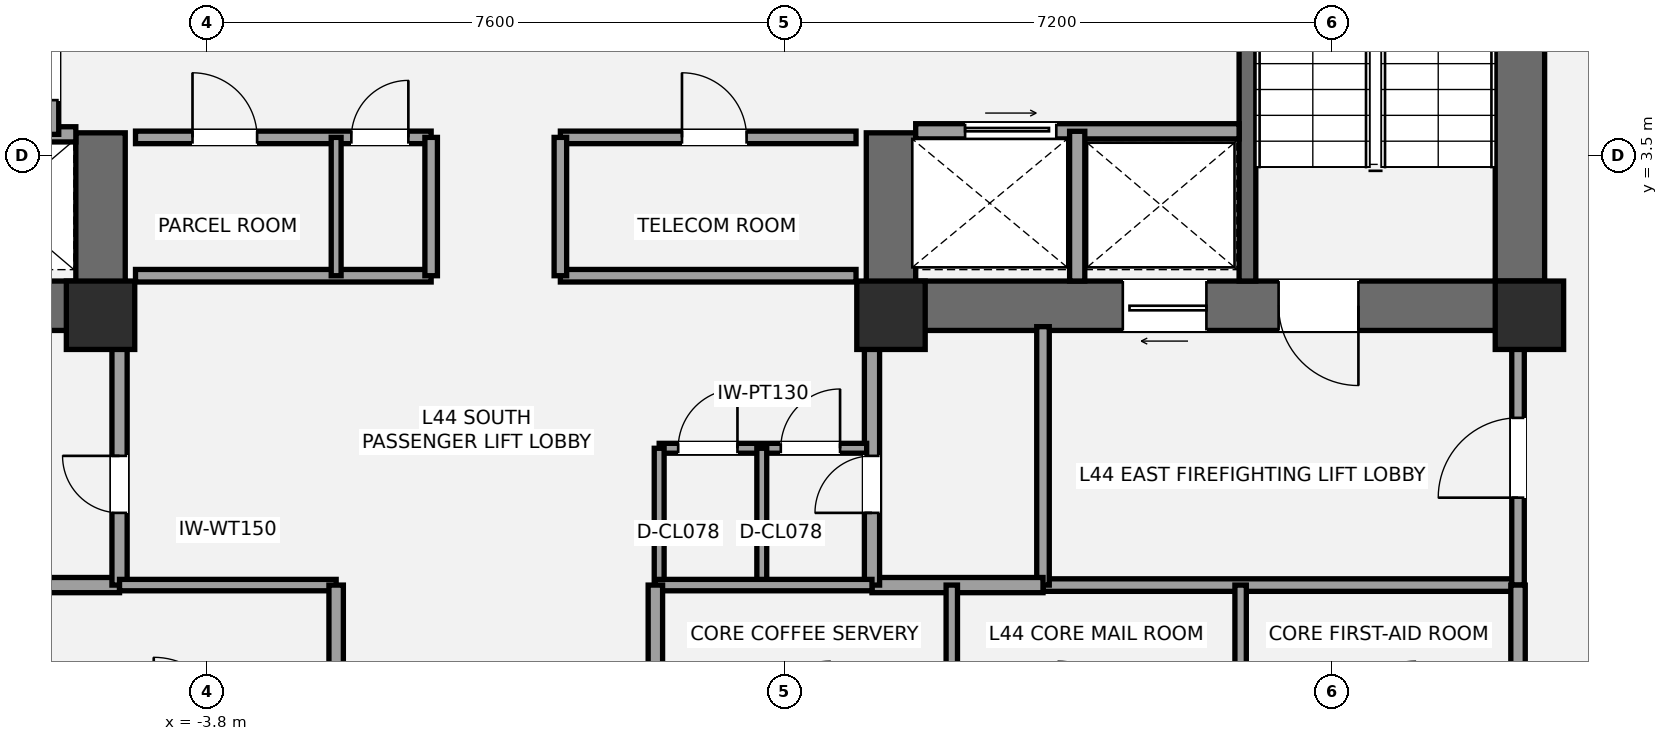
"""IFC4 building model, lengths in metres.
Left out: names, types, materials, properties, quantities, classifications, styles, units other than length and angle.
Written with IfcOpenShell. Run it as: python <this file> out.ifc"""

import sys

from ifc_helpers import new_model, si_unit, direction, frame, frame_2d, origin, origin_2d, place, context, subcontext, project, spatial, rectangle, extrude, element, fill, save


model = new_model("IFC4")
c1 = context("Model", 3, precision=1e-05, world=origin(), true_north=direction((0.0, 1.0)))
c2 = subcontext(c1, "Body", "Model", "MODEL_VIEW")
j1 = project(units=[si_unit("LENGTHUNIT", "METRE"), si_unit("PLANEANGLEUNIT", "RADIAN")], contexts=[c1])
p1 = place(None, origin())
s1 = spatial("IfcSite", under=j1, at=p1, CompositionType="ELEMENT")
p2 = place(p1, origin())
s2 = spatial("IfcBuilding", under=s1, at=p2, CompositionType="ELEMENT")
p3 = place(p2, frame((0.0, 0.0, 163.0)))
s3 = spatial("IfcBuildingStorey", under=s2, at=p3, CompositionType="ELEMENT", Elevation=163.0)
p4 = place(p3, frame((-4.875, 1.525, 0.0), z_axis=(0.0, 0.0, 1.0), x_axis=(-1.0, 0.0, 0.0)))
e1 = element("IfcWall", 1, at=p4, inside=s3, PredefinedType="SHEAR", context=c2, shape_type="SweptSolid", body=[
    extrude(rectangle(XDim=8.925, YDim=0.65, at=frame_2d((4.462, 0.0))), origin(), (0.0, 0.0, 1.0), 3.2),
])
p5 = place(p4, frame((5.425, 0.0, 0.0)))
e2 = element("IfcOpeningElement", 2, at=p5, cuts=e1, PredefinedType="OPENING", context=c2, shape_type="SweptSolid", body=[
    extrude(rectangle(XDim=1.05, YDim=2.15, at=frame_2d((0.525, 1.075))), frame((0.0, 0.335, 0.0), z_axis=(0.0, -1.0, 0.0), x_axis=(1.0, 0.0, 0.0)), (0.0, 0.0, 1.0), 0.67),
])
p6 = place(p4, frame((3.755, 0.0, 0.0)))
e3 = element("IfcOpeningElement", 3, at=p6, cuts=e1, PredefinedType="OPENING", context=c2, shape_type="SweptSolid", body=[
    extrude(rectangle(XDim=1.1, YDim=2.2, at=frame_2d((0.55, 1.1))), frame((0.0, 0.335, 0.0), z_axis=(0.0, -1.0, 0.0), x_axis=(1.0, 0.0, 0.0)), (0.0, 0.0, 1.0), 0.67),
])
p7 = place(p3, frame((-5.2, 1.2, 0.0), z_axis=(0.0, 0.0, 1.0), x_axis=(0.0, 1.0, 0.0)))
e4 = element("IfcWall", 4, at=p7, inside=s3, PredefinedType="SHEAR", context=c2, shape_type="SweptSolid", body=[
    extrude(rectangle(XDim=2.6, YDim=0.65, at=frame_2d((1.3, 0.0))), origin(), (0.0, 0.0, 1.0), 3.2),
])
p8 = place(p3, frame((13.475, 1.2, 0.0), z_axis=(0.0, 0.0, 1.0), x_axis=(0.0, 1.0, 0.0)))
e5 = element("IfcWall", 5, at=p8, inside=s3, PredefinedType="SHEAR", context=c2, shape_type="SweptSolid", body=[
    extrude(rectangle(XDim=8.45, YDim=0.65, at=frame_2d((4.225, 0.0))), origin(), (0.0, 0.0, 1.0), 3.2),
])
p9 = place(p3, frame((13.8, 1.525, 0.0), z_axis=(0.0, 0.0, 1.0), x_axis=(-1.0, 0.0, 0.0)))
e6 = element("IfcWall", 6, at=p9, inside=s3, PredefinedType="SHEAR", context=c2, shape_type="SweptSolid", body=[
    extrude(rectangle(XDim=8.925, YDim=0.65, at=frame_2d((4.462, 0.0))), origin(), (0.0, 0.0, 1.0), 3.2),
])
p10 = place(p9, frame((2.45, 0.0, 0.0)))
e7 = element("IfcOpeningElement", 7, at=p10, cuts=e6, PredefinedType="OPENING", context=c2, shape_type="SweptSolid", body=[
    extrude(rectangle(XDim=1.05, YDim=2.15, at=frame_2d((0.525, 1.075))), frame((0.0, 0.335, 0.0), z_axis=(0.0, -1.0, 0.0), x_axis=(1.0, 0.0, 0.0)), (0.0, 0.0, 1.0), 0.67),
])
p11 = place(p9, frame((4.45, 0.0, 0.0)))
e8 = element("IfcOpeningElement", 8, at=p11, cuts=e6, PredefinedType="OPENING", context=c2, shape_type="SweptSolid", body=[
    extrude(rectangle(XDim=1.1, YDim=2.2, at=frame_2d((0.55, 1.1))), frame((0.0, 0.335, 0.0), z_axis=(0.0, -1.0, 0.0), x_axis=(1.0, 0.0, 0.0)), (0.0, 0.0, 1.0), 0.67),
])
p12 = place(p3, frame((5.2, 1.2, 0.0), z_axis=(0.0, 0.0, 1.0), x_axis=(0.0, 1.0, 0.0)))
e9 = element("IfcWall", 9, at=p12, inside=s3, PredefinedType="SHEAR", context=c2, shape_type="SweptSolid", body=[
    extrude(rectangle(XDim=2.6, YDim=0.65, at=frame_2d((1.3, 0.0))), origin(), (0.0, 0.0, 1.0), 3.2),
])
p13 = place(p3, frame((9.89, 1.85, 0.0), z_axis=(0.0, 0.0, 1.0), x_axis=(0.0, 1.0, 0.0)))
e10 = element("IfcWall", 10, at=p13, inside=s3, PredefinedType="SHEAR", context=c2, shape_type="SweptSolid", body=[
    extrude(rectangle(XDim=7.15, YDim=0.22, at=frame_2d((3.575, 0.0))), origin(), (0.0, 0.0, 1.0), 3.2),
])
for number, where, z_axis, x_axis in (
    (11, (-5.2, 1.4, 0.0), (0.0, 0.0, 1.0), (1.0, 0.0, 0.0)),
    (12, (5.2, 1.4, 0.0), (0.0, 0.0, 1.0), (1.0, 0.0, 0.0)),
    (13, (13.6, 1.4, 0.0), (0.0, 0.0, 1.0), (1.0, 0.0, 0.0)),
):
    element("IfcColumn", number, at=place(p3, frame(where, z_axis=z_axis, x_axis=x_axis)), inside=s3, PredefinedType="COLUMN", context=c2, shape_type="SweptSolid", body=[
        extrude(rectangle(XDim=0.9, YDim=0.9, at=origin_2d()), origin(), (0.0, 0.0, 1.0), 3.2),
    ])
p14 = place(p3, frame((-7.2, -2.15, 0.0), z_axis=(0.0, 0.0, 1.0), x_axis=(1.0, 0.0, 0.0)))
e14 = element("IfcWall", 14, at=p14, inside=s3, PredefinedType="SOLIDWALL", context=c2, shape_type="SweptSolid", body=[
    extrude(rectangle(XDim=2.25, YDim=0.2, at=frame_2d((1.125, 0.0))), origin(), (0.0, 0.0, 1.0), 3.02),
])
p15 = place(p3, frame((-4.95, -2.15, 0.0), z_axis=(0.0, 0.0, 1.0), x_axis=(0.0, 1.0, 0.0)))
e15 = element("IfcWall", 15, at=p15, inside=s3, PredefinedType="SOLIDWALL", context=c2, shape_type="SweptSolid", body=[
    extrude(rectangle(XDim=3.4, YDim=0.2, at=frame_2d((1.7, 0.0))), origin(), (0.0, 0.0, 1.0), 2.473),
])
p16 = place(p15, frame((0.95, 0.0, 0.0)))
e16 = element("IfcOpeningElement", 16, at=p16, cuts=e15, PredefinedType="OPENING", context=c2, shape_type="SweptSolid", body=[
    extrude(rectangle(XDim=0.75, YDim=2.1, at=frame_2d((0.375, 1.05))), frame((0.0, 0.11, 0.0), z_axis=(0.0, -1.0, 0.0), x_axis=(1.0, 0.0, 0.0)), (0.0, 0.0, 1.0), 0.22),
])
p17 = place(p3, frame((7.2, -2.15, 0.0), z_axis=(0.0, 0.0, 1.0), x_axis=(1.0, 0.0, 0.0)))
e17 = element("IfcWall", 17, at=p17, inside=s3, PredefinedType="PARTITIONING", context=c2, shape_type="SweptSolid", body=[
    extrude(rectangle(XDim=6.25, YDim=0.165, at=frame_2d((3.125, 0.0))), origin(), (0.0, 0.0, 1.0), 3.02),
])
p18 = place(p3, frame((7.2, -2.15, 0.0), z_axis=(0.0, 0.0, 1.0), x_axis=(0.0, 1.0, 0.0)))
e18 = element("IfcWall", 18, at=p18, inside=s3, PredefinedType="PARTITIONING", context=c2, shape_type="SweptSolid", body=[
    extrude(rectangle(XDim=3.4, YDim=0.165, at=frame_2d((1.7, 0.0))), origin(), (0.0, 0.0, 1.0), 2.473),
])
p19 = place(p3, frame((13.45, -2.15, 0.0), z_axis=(0.0, 0.0, 1.0), x_axis=(0.0, 1.0, 0.0)))
e19 = element("IfcWall", 19, at=p19, inside=s3, PredefinedType="PARTITIONING", context=c2, shape_type="SweptSolid", body=[
    extrude(rectangle(XDim=3.4, YDim=0.165, at=frame_2d((1.7, 0.0))), origin(), (0.0, 0.0, 1.0), 3.02),
])
p20 = place(p19, frame((1.15, 0.0, 0.0)))
e20 = element("IfcOpeningElement", 20, at=p20, cuts=e19, PredefinedType="OPENING", context=c2, shape_type="SweptSolid", body=[
    extrude(rectangle(XDim=1.05, YDim=2.15, at=frame_2d((0.525, 1.075))), frame((0.0, 0.093, 0.0), z_axis=(0.0, -1.0, 0.0), x_axis=(1.0, 0.0, 0.0)), (0.0, 0.0, 1.0), 0.185),
])
p21 = place(p3, frame((4.95, -2.15, 0.0), z_axis=(0.0, 0.0, 1.0), x_axis=(1.0, 0.0, 0.0)))
e21 = element("IfcWall", 21, at=p21, inside=s3, PredefinedType="SOLIDWALL", context=c2, shape_type="SweptSolid", body=[
    extrude(rectangle(XDim=2.25, YDim=0.2, at=frame_2d((1.125, 0.0))), origin(), (0.0, 0.0, 1.0), 3.02),
])
p22 = place(p3, frame((4.95, -2.15, 0.0), z_axis=(0.0, 0.0, 1.0), x_axis=(0.0, 1.0, 0.0)))
e22 = element("IfcWall", 22, at=p22, inside=s3, PredefinedType="SOLIDWALL", context=c2, shape_type="SweptSolid", body=[
    extrude(rectangle(XDim=3.4, YDim=0.2, at=frame_2d((1.7, 0.0))), origin(), (0.0, 0.0, 1.0), 2.473),
])
p23 = place(p22, frame((0.95, 0.0, 0.0)))
e23 = element("IfcOpeningElement", 23, at=p23, cuts=e22, PredefinedType="OPENING", context=c2, shape_type="SweptSolid", body=[
    extrude(rectangle(XDim=0.75, YDim=2.1, at=frame_2d((0.375, 1.05))), frame((0.0, 0.11, 0.0), z_axis=(0.0, -1.0, 0.0), x_axis=(1.0, 0.0, 0.0)), (0.0, 0.0, 1.0), 0.22),
])
p24 = place(p3, frame((2.15, -0.35, 0.0), z_axis=(0.0, 0.0, 1.0), x_axis=(1.0, 0.0, 0.0)))
e24 = element("IfcWall", 24, at=p24, inside=s3, PredefinedType="PARTITIONING", context=c2, shape_type="SweptSolid", body=[
    extrude(rectangle(XDim=2.73, YDim=0.13, at=frame_2d((1.365, 0.0))), origin(), (0.0, 0.0, 1.0), 3.02),
])
p25 = place(p24, frame((0.25, 0.0, 0.0)))
e25 = element("IfcOpeningElement", 25, at=p25, cuts=e24, PredefinedType="OPENING", context=c2, shape_type="SweptSolid", body=[
    extrude(rectangle(XDim=0.78, YDim=2.1, at=frame_2d((0.39, 1.05))), frame((0.0, 0.075, 0.0), z_axis=(0.0, -1.0, 0.0), x_axis=(1.0, 0.0, 0.0)), (0.0, 0.0, 1.0), 0.15),
])
p26 = place(p24, frame((1.6, 0.0, 0.0)))
e26 = element("IfcOpeningElement", 26, at=p26, cuts=e24, PredefinedType="OPENING", context=c2, shape_type="SweptSolid", body=[
    extrude(rectangle(XDim=0.78, YDim=2.1, at=frame_2d((0.39, 1.05))), frame((0.0, 0.075, 0.0), z_axis=(0.0, -1.0, 0.0), x_axis=(1.0, 0.0, 0.0)), (0.0, 0.0, 1.0), 0.15),
])
p27 = place(p3, frame((2.15, -2.15, 0.0), z_axis=(0.0, 0.0, 1.0), x_axis=(0.0, 1.0, 0.0)))
e27 = element("IfcWall", 27, at=p27, inside=s3, PredefinedType="PARTITIONING", context=c2, shape_type="SweptSolid", body=[
    extrude(rectangle(XDim=1.8, YDim=0.13, at=frame_2d((0.9, 0.0))), origin(), (0.0, 0.0, 1.0), 3.02),
])
p28 = place(p3, frame((3.5, -2.15, 0.0), z_axis=(0.0, 0.0, 1.0), x_axis=(0.0, 1.0, 0.0)))
e28 = element("IfcWall", 28, at=p28, inside=s3, PredefinedType="PARTITIONING", context=c2, shape_type="SweptSolid", body=[
    extrude(rectangle(XDim=1.8, YDim=0.13, at=frame_2d((0.9, 0.0))), origin(), (0.0, 0.0, 1.0), 2.473),
])
p29 = place(p3, frame((-9.78, 3.78, 0.0), z_axis=(0.0, 0.0, 1.0), x_axis=(1.0, 0.0, 0.0)))
e29 = element("IfcWall", 29, at=p29, inside=s3, PredefinedType="SOLIDWALL", context=c2, shape_type="SweptSolid", body=[
    extrude(rectangle(XDim=4.255, YDim=0.2, at=frame_2d((2.127, 0.0))), origin(), (0.0, 0.0, 1.0), 3.02),
])
p30 = place(p3, frame((-5.85, 3.78, 0.0), z_axis=(0.0, 0.0, 1.0), x_axis=(0.0, 1.0, 0.0)))
e30 = element("IfcWall", 30, at=p30, inside=s3, PredefinedType="SOLIDWALL", context=c2, shape_type="SweptSolid", body=[
    extrude(rectangle(XDim=1.69, YDim=0.2, at=frame_2d((0.845, 0.0))), origin(), (0.0, 0.0, 1.0), 3.02),
])
p31 = place(p30, frame((0.45, 0.0, 0.0)))
e31 = element("IfcOpeningElement", 31, at=p31, cuts=e30, PredefinedType="OPENING", context=c2, shape_type="SweptSolid", body=[
    extrude(rectangle(XDim=0.75, YDim=2.1, at=frame_2d((0.375, 1.05))), frame((0.0, 0.11, 0.0), z_axis=(0.0, -1.0, 0.0), x_axis=(1.0, 0.0, 0.0)), (0.0, 0.0, 1.0), 0.22),
])
p32 = place(p3, frame((5.525, 3.82, 0.0), z_axis=(0.0, 0.0, 1.0), x_axis=(1.0, 0.0, 0.0)))
e32 = element("IfcWall", 32, at=p32, inside=s3, PredefinedType="SOLIDWALL", context=c2, shape_type="SweptSolid", body=[
    extrude(rectangle(XDim=4.255, YDim=0.2, at=frame_2d((2.127, 0.0))), origin(), (0.0, 0.0, 1.0), 3.02),
])
p33 = place(p32, frame((0.65, 0.0, 0.0)))
e33 = element("IfcOpeningElement", 33, at=p33, cuts=e32, PredefinedType="OPENING", context=c2, shape_type="SweptSolid", body=[
    extrude(rectangle(XDim=1.2, YDim=2.2, at=frame_2d((0.6, 1.1))), frame((0.0, 0.11, 0.0), z_axis=(0.0, -1.0, 0.0), x_axis=(1.0, 0.0, 0.0)), (0.0, 0.0, 1.0), 0.22),
])
p34 = place(p3, frame((7.65, 1.85, 0.0), z_axis=(0.0, 0.0, 1.0), x_axis=(0.0, 1.0, 0.0)))
e34 = element("IfcWall", 34, at=p34, inside=s3, PredefinedType="SOLIDWALL", context=c2, shape_type="SweptSolid", body=[
    extrude(rectangle(XDim=1.97, YDim=0.2, at=frame_2d((0.985, 0.0))), origin(), (0.0, 0.0, 1.0), 3.02),
])
p35 = place(p3, frame((-4.74, 1.92, 0.0), z_axis=(0.0, 0.0, 1.0), x_axis=(1.0, 0.0, 0.0)))
e35 = element("IfcWall", 35, at=p35, inside=s3, PredefinedType="PARTITIONING", context=c2, shape_type="SweptSolid", body=[
    extrude(rectangle(XDim=3.89, YDim=0.165, at=frame_2d((1.945, 0.0))), origin(), (0.0, 0.0, 1.0), 2.16),
])
p36 = place(p3, frame((-4.74, 3.74, 0.0), z_axis=(0.0, 0.0, 1.0), x_axis=(1.0, 0.0, 0.0)))
e36 = element("IfcWall", 36, at=p36, inside=s3, PredefinedType="PARTITIONING", context=c2, shape_type="SweptSolid", body=[
    extrude(rectangle(XDim=3.89, YDim=0.165, at=frame_2d((1.945, 0.0))), origin(), (0.0, 0.0, 1.0), 3.02),
])
p37 = place(p36, frame((0.75, 0.0, 0.0)))
e37 = element("IfcOpeningElement", 37, at=p37, cuts=e36, PredefinedType="OPENING", context=c2, shape_type="SweptSolid", body=[
    extrude(rectangle(XDim=0.85, YDim=2.1, at=frame_2d((0.425, 1.05))), frame((0.0, 0.093, 0.0), z_axis=(0.0, -1.0, 0.0), x_axis=(1.0, 0.0, 0.0)), (0.0, 0.0, 1.0), 0.185),
])
p38 = place(p36, frame((2.84, 0.0, 0.0)))
e38 = element("IfcOpeningElement", 38, at=p38, cuts=e36, PredefinedType="OPENING", context=c2, shape_type="SweptSolid", body=[
    extrude(rectangle(XDim=0.75, YDim=2.1, at=frame_2d((0.375, 1.05))), frame((0.0, 0.093, 0.0), z_axis=(0.0, -1.0, 0.0), x_axis=(1.0, 0.0, 0.0)), (0.0, 0.0, 1.0), 0.185),
])
p39 = place(p3, frame((-0.85, 1.92, 0.0), z_axis=(0.0, 0.0, 1.0), x_axis=(0.0, 1.0, 0.0)))
e39 = element("IfcWall", 39, at=p39, inside=s3, PredefinedType="PARTITIONING", context=c2, shape_type="SweptSolid", body=[
    extrude(rectangle(XDim=1.82, YDim=0.165, at=frame_2d((0.91, 0.0))), origin(), (0.0, 0.0, 1.0), 3.02),
])
p40 = place(p3, frame((0.85, 1.92, 0.0), z_axis=(0.0, 0.0, 1.0), x_axis=(1.0, 0.0, 0.0)))
e40 = element("IfcWall", 40, at=p40, inside=s3, PredefinedType="PARTITIONING", context=c2, shape_type="SweptSolid", body=[
    extrude(rectangle(XDim=3.89, YDim=0.165, at=frame_2d((1.945, 0.0))), origin(), (0.0, 0.0, 1.0), 2.16),
])
p41 = place(p3, frame((0.85, 3.74, 0.0), z_axis=(0.0, 0.0, 1.0), x_axis=(1.0, 0.0, 0.0)))
e41 = element("IfcWall", 41, at=p41, inside=s3, PredefinedType="PARTITIONING", context=c2, shape_type="SweptSolid", body=[
    extrude(rectangle(XDim=3.89, YDim=0.165, at=frame_2d((1.945, 0.0))), origin(), (0.0, 0.0, 1.0), 3.02),
])
p42 = place(p41, frame((1.6, 0.0, 0.0)))
e42 = element("IfcOpeningElement", 42, at=p42, cuts=e41, PredefinedType="OPENING", context=c2, shape_type="SweptSolid", body=[
    extrude(rectangle(XDim=0.85, YDim=2.1, at=frame_2d((0.425, 1.05))), frame((0.0, 0.093, 0.0), z_axis=(0.0, -1.0, 0.0), x_axis=(1.0, 0.0, 0.0)), (0.0, 0.0, 1.0), 0.185),
])
p43 = place(p3, frame((0.85, 1.92, 0.0), z_axis=(0.0, 0.0, 1.0), x_axis=(0.0, 1.0, 0.0)))
e43 = element("IfcWall", 43, at=p43, inside=s3, PredefinedType="PARTITIONING", context=c2, shape_type="SweptSolid", body=[
    extrude(rectangle(XDim=1.82, YDim=0.165, at=frame_2d((0.91, 0.0))), origin(), (0.0, 0.0, 1.0), 3.02),
])
p44 = place(p3, frame((-2.1, 1.92, 0.0), z_axis=(0.0, 0.0, 1.0), x_axis=(0.0, 1.0, 0.0)))
e44 = element("IfcWall", 44, at=p44, inside=s3, PredefinedType="PARTITIONING", context=c2, shape_type="SweptSolid", body=[
    extrude(rectangle(XDim=1.82, YDim=0.13, at=frame_2d((0.91, 0.0))), origin(), (0.0, 0.0, 1.0), 3.02),
])
p45 = place(p3, frame((-4.95, -2.15, 0.0), z_axis=(0.0, 0.0, 1.0), x_axis=(1.0, 0.0, 0.0)))
e45 = element("IfcWall", 45, at=p45, inside=s3, PredefinedType="PLUMBINGWALL", context=c2, shape_type="SweptSolid", body=[
    extrude(rectangle(XDim=2.85, YDim=0.15, at=frame_2d((1.425, 0.0))), origin(), (0.0, 0.0, 1.0), 2.473),
])
p46 = place(p3, frame((-2.1, -4.05, 0.0), z_axis=(0.0, 0.0, 1.0), x_axis=(0.0, 1.0, 0.0)))
e46 = element("IfcWall", 46, at=p46, inside=s3, PredefinedType="PLUMBINGWALL", context=c2, shape_type="SweptSolid", body=[
    extrude(rectangle(XDim=1.9, YDim=0.19, at=frame_2d((0.95, 0.0))), origin(), (0.0, 0.0, 1.0), 2.473),
])
p47 = place(p3, frame((2.1, -2.15, 0.0), z_axis=(0.0, 0.0, 1.0), x_axis=(1.0, 0.0, 0.0)))
e47 = element("IfcWall", 47, at=p47, inside=s3, PredefinedType="PLUMBINGWALL", context=c2, shape_type="SweptSolid", body=[
    extrude(rectangle(XDim=2.85, YDim=0.15, at=frame_2d((1.425, 0.0))), origin(), (0.0, 0.0, 1.0), 3.02),
])
for number, where, z_axis, x_axis in (
    (48, (2.1, -4.05, 0.0), (0.0, 0.0, 1.0), (0.0, 1.0, 0.0)),
    (49, (13.45, -4.05, 0.0), (0.0, 0.0, 1.0), (0.0, 1.0, 0.0)),
):
    element("IfcWall", number, at=place(p3, frame(where, z_axis=z_axis, x_axis=x_axis)), inside=s3, PredefinedType="PLUMBINGWALL", context=c2, shape_type="SweptSolid", body=[
        extrude(rectangle(XDim=1.9, YDim=0.19, at=frame_2d((0.95, 0.0))), origin(), (0.0, 0.0, 1.0), 2.473),
    ])
p48 = place(p3, frame((6.0, -4.05, 0.0), z_axis=(0.0, 0.0, 1.0), x_axis=(0.0, 1.0, 0.0)))
e50 = element("IfcWall", 50, at=p48, inside=s3, PredefinedType="PLUMBINGWALL", context=c2, shape_type="SweptSolid", body=[
    extrude(rectangle(XDim=1.9, YDim=0.15, at=frame_2d((0.95, 0.0))), origin(), (0.0, 0.0, 1.0), 2.473),
])
p49 = place(p3, frame((9.8, -4.05, 0.0), z_axis=(0.0, 0.0, 1.0), x_axis=(0.0, 1.0, 0.0)))
e51 = element("IfcWall", 51, at=p49, inside=s3, PredefinedType="PLUMBINGWALL", context=c2, shape_type="SweptSolid", body=[
    extrude(rectangle(XDim=1.9, YDim=0.15, at=frame_2d((0.95, 0.0))), origin(), (0.0, 0.0, 1.0), 3.02),
])
p50 = place(p10, origin())
e52 = element("IfcDoor", 52, at=p50, inside=s3, OperationType="SINGLE_SWING_LEFT", PredefinedType="DOOR", context=c2, shape_type="SweptSolid", body=[
    extrude(rectangle(XDim=1.05, YDim=2.15, at=frame_2d((0.525, 1.075))), frame((0.0, 0.025, 0.0), z_axis=(0.0, -1.0, 0.0), x_axis=(1.0, 0.0, 0.0)), (0.0, 0.0, 1.0), 0.05),
])
fill(e7, e52)
p51 = place(p16, origin())
e53 = element("IfcDoor", 53, at=p51, inside=s3, OperationType="SINGLE_SWING_RIGHT", PredefinedType="DOOR", context=c2, shape_type="SweptSolid", body=[
    extrude(rectangle(XDim=0.75, YDim=2.1, at=frame_2d((0.375, 1.05))), frame((0.0, 0.025, 0.0), z_axis=(0.0, -1.0, 0.0), x_axis=(1.0, 0.0, 0.0)), (0.0, 0.0, 1.0), 0.05),
])
fill(e16, e53)
p52 = place(p20, origin())
e54 = element("IfcDoor", 54, at=p52, inside=s3, OperationType="SINGLE_SWING_LEFT", PredefinedType="DOOR", context=c2, shape_type="SweptSolid", body=[
    extrude(rectangle(XDim=1.05, YDim=2.15, at=frame_2d((0.525, 1.075))), frame((0.0, 0.025, 0.0), z_axis=(0.0, -1.0, 0.0), x_axis=(1.0, 0.0, 0.0)), (0.0, 0.0, 1.0), 0.05),
])
fill(e20, e54)
p53 = place(p23, origin())
e55 = element("IfcDoor", 55, at=p53, inside=s3, OperationType="SINGLE_SWING_LEFT", PredefinedType="DOOR", context=c2, shape_type="SweptSolid", body=[
    extrude(rectangle(XDim=0.75, YDim=2.1, at=frame_2d((0.375, 1.05))), frame((0.0, 0.025, 0.0), z_axis=(0.0, -1.0, 0.0), x_axis=(1.0, 0.0, 0.0)), (0.0, 0.0, 1.0), 0.05),
])
fill(e23, e55)
p54 = place(p25, origin())
e56 = element("IfcDoor", 56, at=p54, inside=s3, OperationType="SINGLE_SWING_RIGHT", PredefinedType="DOOR", context=c2, shape_type="SweptSolid", body=[
    extrude(rectangle(XDim=0.78, YDim=2.1, at=frame_2d((0.39, 1.05))), frame((0.0, 0.025, 0.0), z_axis=(0.0, -1.0, 0.0), x_axis=(1.0, 0.0, 0.0)), (0.0, 0.0, 1.0), 0.05),
])
fill(e25, e56)
p55 = place(p26, origin())
e57 = element("IfcDoor", 57, at=p55, inside=s3, OperationType="SINGLE_SWING_RIGHT", PredefinedType="DOOR", context=c2, shape_type="SweptSolid", body=[
    extrude(rectangle(XDim=0.78, YDim=2.1, at=frame_2d((0.39, 1.05))), frame((0.0, 0.025, 0.0), z_axis=(0.0, -1.0, 0.0), x_axis=(1.0, 0.0, 0.0)), (0.0, 0.0, 1.0), 0.05),
])
fill(e26, e57)
p56 = place(p31, origin())
e58 = element("IfcDoor", 58, at=p56, inside=s3, OperationType="SINGLE_SWING_RIGHT", PredefinedType="DOOR", context=c2, shape_type="SweptSolid", body=[
    extrude(rectangle(XDim=0.75, YDim=2.1, at=frame_2d((0.375, 1.05))), frame((0.0, 0.025, 0.0), z_axis=(0.0, -1.0, 0.0), x_axis=(1.0, 0.0, 0.0)), (0.0, 0.0, 1.0), 0.05),
])
fill(e31, e58)
p57 = place(p11, origin())
e59 = element("IfcDoor", 59, at=p57, inside=s3, OperationType="SLIDING_TO_LEFT", PredefinedType="DOOR", context=c2, shape_type="SweptSolid", body=[
    extrude(rectangle(XDim=1.1, YDim=2.2, at=frame_2d((0.55, 1.1))), frame((0.0, 0.025, 0.0), z_axis=(0.0, -1.0, 0.0), x_axis=(1.0, 0.0, 0.0)), (0.0, 0.0, 1.0), 0.05),
])
fill(e8, e59)
p58 = place(p33, origin())
e60 = element("IfcDoor", 60, at=p58, inside=s3, OperationType="SLIDING_TO_RIGHT", PredefinedType="DOOR", context=c2, shape_type="SweptSolid", body=[
    extrude(rectangle(XDim=1.2, YDim=2.2, at=frame_2d((0.6, 1.1))), frame((0.0, 0.025, 0.0), z_axis=(0.0, -1.0, 0.0), x_axis=(1.0, 0.0, 0.0)), (0.0, 0.0, 1.0), 0.05),
])
fill(e33, e60)
p59 = place(p37, origin())
e61 = element("IfcDoor", 61, at=p59, inside=s3, OperationType="SINGLE_SWING_LEFT", PredefinedType="DOOR", context=c2, shape_type="SweptSolid", body=[
    extrude(rectangle(XDim=0.85, YDim=2.1, at=frame_2d((0.425, 1.05))), frame((0.0, 0.025, 0.0), z_axis=(0.0, -1.0, 0.0), x_axis=(1.0, 0.0, 0.0)), (0.0, 0.0, 1.0), 0.05),
])
fill(e37, e61)
p60 = place(p38, origin())
e62 = element("IfcDoor", 62, at=p60, inside=s3, OperationType="SINGLE_SWING_RIGHT", PredefinedType="DOOR", context=c2, shape_type="SweptSolid", body=[
    extrude(rectangle(XDim=0.75, YDim=2.1, at=frame_2d((0.375, 1.05))), frame((0.0, 0.025, 0.0), z_axis=(0.0, -1.0, 0.0), x_axis=(1.0, 0.0, 0.0)), (0.0, 0.0, 1.0), 0.05),
])
fill(e38, e62)
p61 = place(p42, origin())
e63 = element("IfcDoor", 63, at=p61, inside=s3, OperationType="SINGLE_SWING_LEFT", PredefinedType="DOOR", context=c2, shape_type="SweptSolid", body=[
    extrude(rectangle(XDim=0.85, YDim=2.1, at=frame_2d((0.425, 1.05))), frame((0.0, 0.025, 0.0), z_axis=(0.0, -1.0, 0.0), x_axis=(1.0, 0.0, 0.0)), (0.0, 0.0, 1.0), 0.05),
])
fill(e42, e63)
save(model, sys.argv[1])
